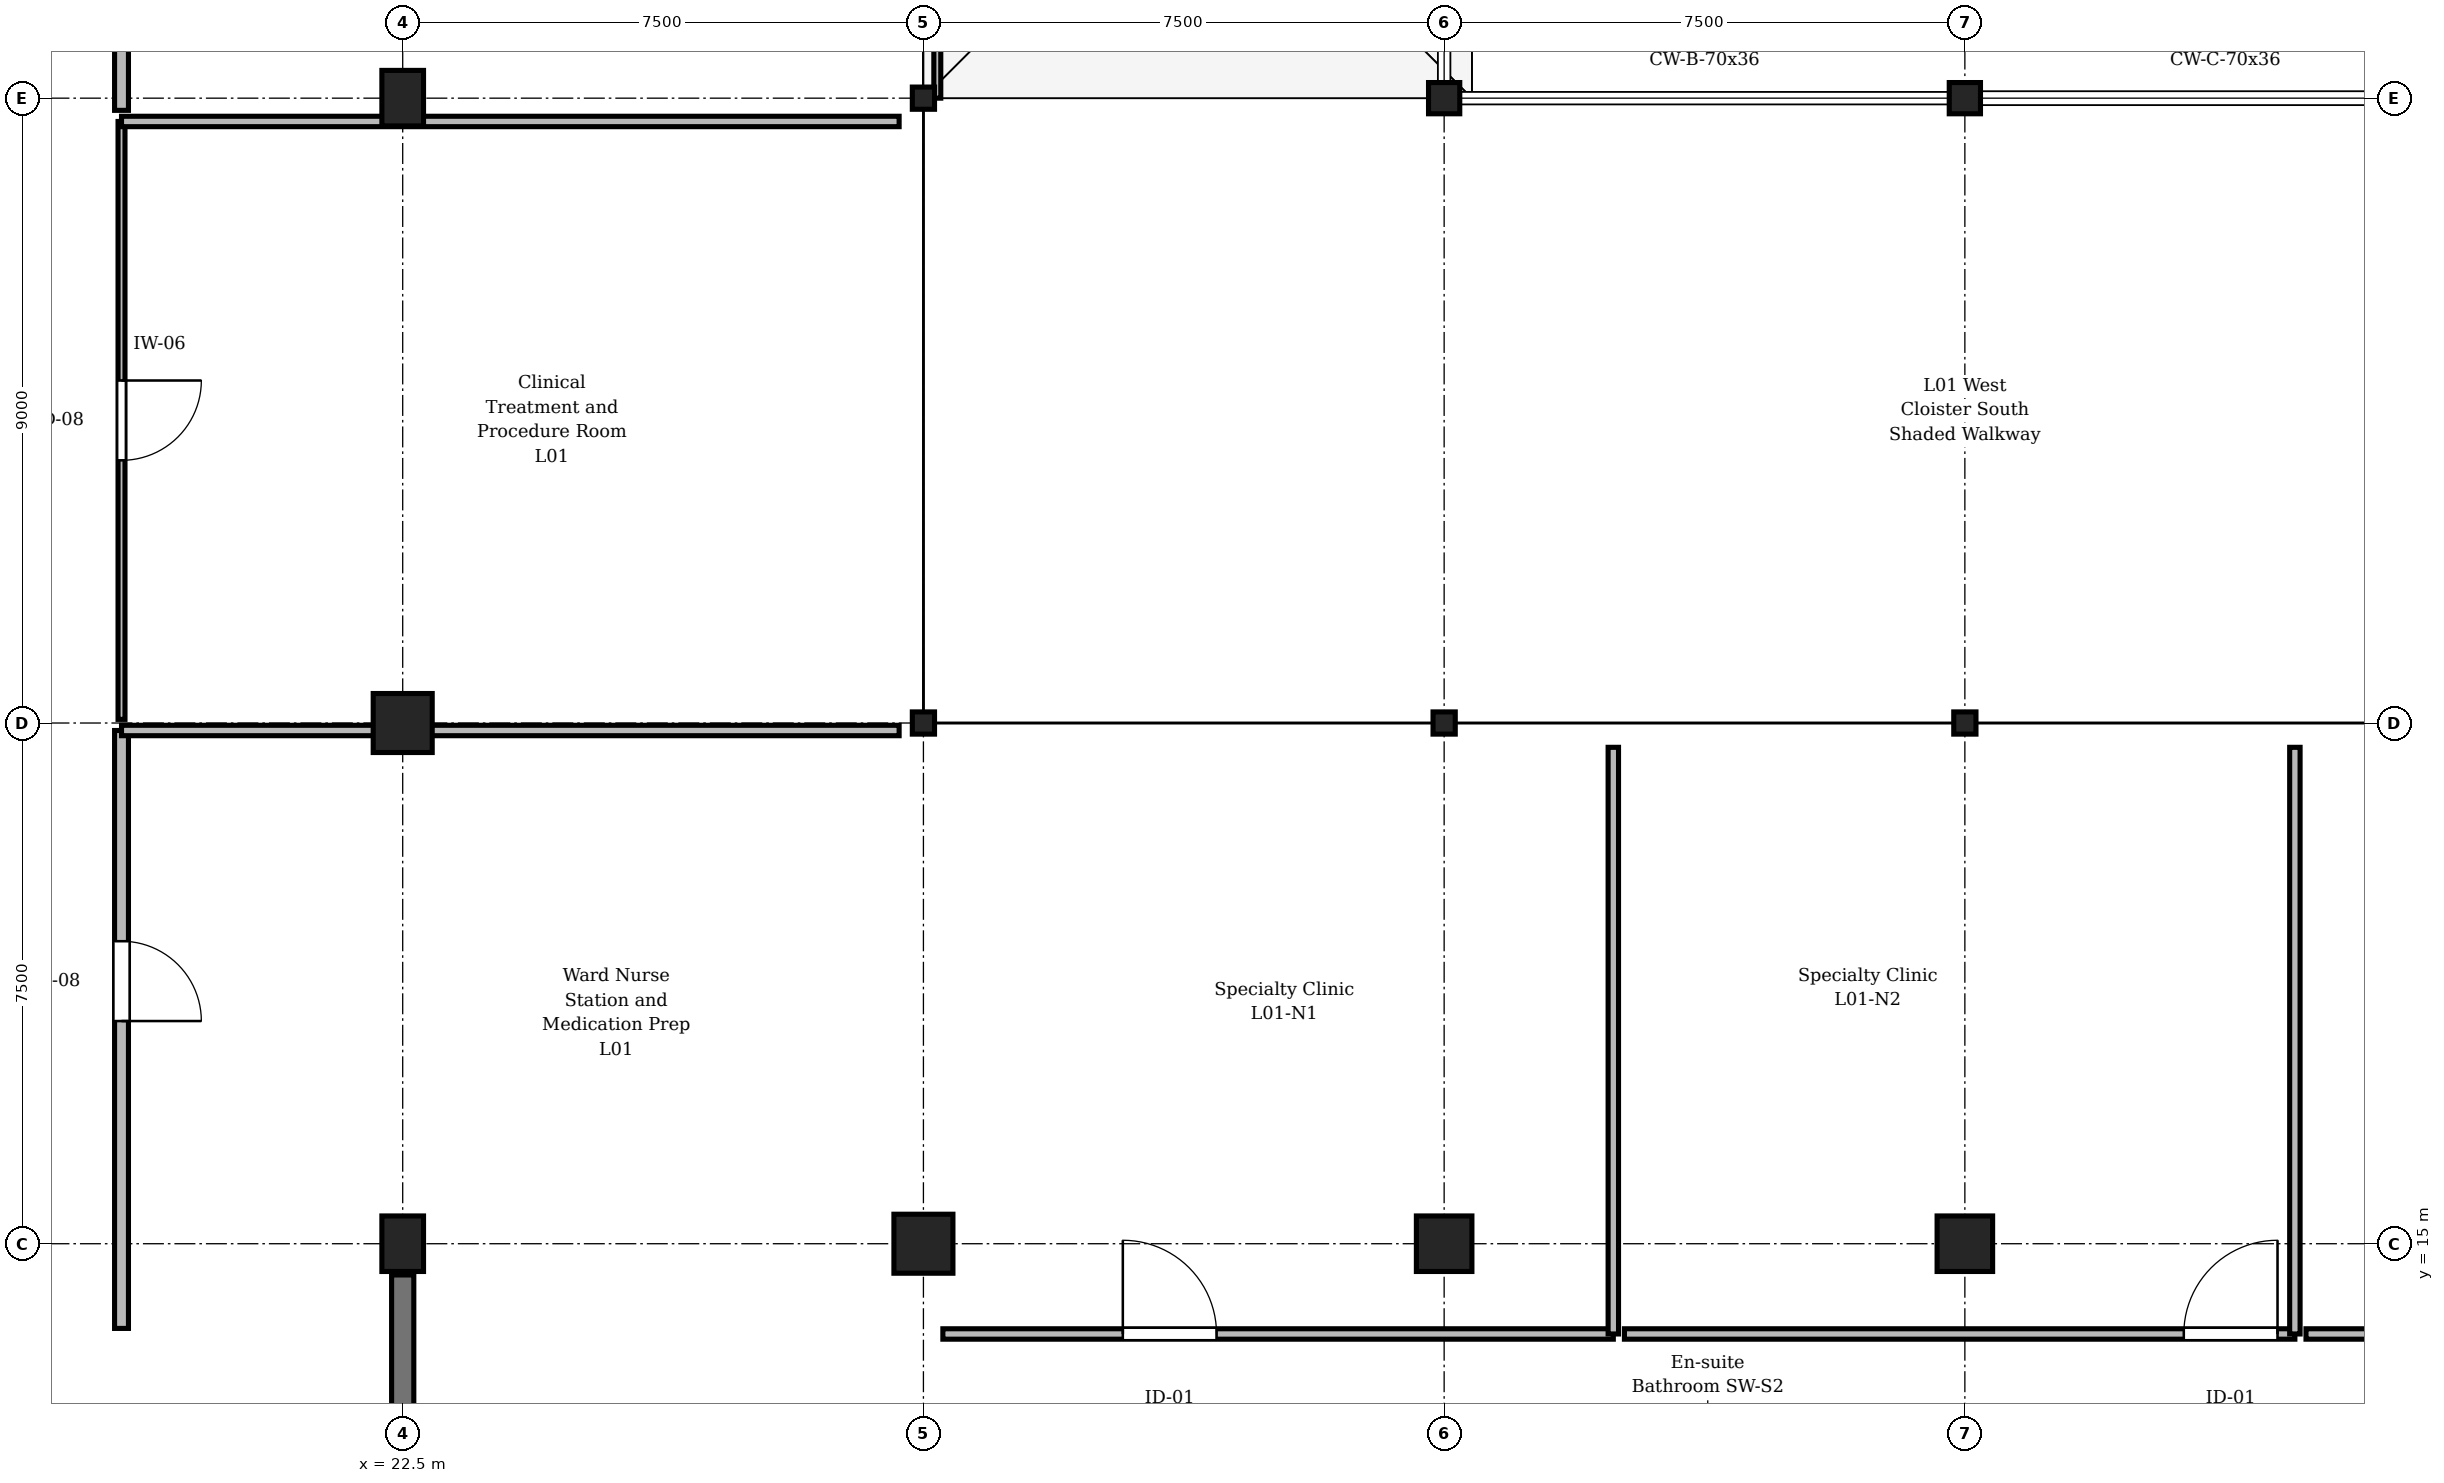
"""IFC4 building model, lengths in metres.
Left out: names, types, materials, properties, quantities, classifications, styles, units other than length and angle.
Written with IfcOpenShell. Run it as: python <this file> out.ifc"""

import sys

from ifc_helpers import new_model, si_unit, direction, frame, frame_2d, origin, origin_2d, place, context, subcontext, project, spatial, rectangle, extrude, element, fill, save


model = new_model("IFC4")
c1 = context("Model", 3, precision=1e-05, world=origin(), true_north=direction((0.0, 1.0)))
c2 = subcontext(c1, "Body", "Model", "MODEL_VIEW")
j1 = project(units=[si_unit("LENGTHUNIT", "METRE"), si_unit("PLANEANGLEUNIT", "RADIAN")], contexts=[c1])
p1 = place(None, origin())
s1 = spatial("IfcSite", under=j1, at=p1, CompositionType="ELEMENT")
p2 = place(p1, origin())
s2 = spatial("IfcBuilding", under=s1, at=p2, CompositionType="ELEMENT")
p3 = place(p2, frame((0.0, 0.0, 4.8)))
s3 = spatial("IfcBuildingStorey", under=s2, at=p3, CompositionType="ELEMENT", Elevation=4.8)
p4 = place(p3, frame((22.5, 15.0, 0.0), z_axis=(0.0, 0.0, 1.0), x_axis=(1.0, 0.0, 0.0)))
e1 = element("IfcColumn", 1, at=p4, inside=s3, PredefinedType="COLUMN", context=c2, shape_type="SweptSolid", body=[
    extrude(rectangle(XDim=0.6, YDim=0.8, at=origin_2d()), origin(), (0.0, 0.0, 1.0), 4.5),
])
p5 = place(p3, frame((22.5, 22.5, 0.0), z_axis=(0.0, 0.0, 1.0), x_axis=(1.0, 0.0, 0.0)))
e2 = element("IfcColumn", 2, at=p5, inside=s3, PredefinedType="COLUMN", context=c2, shape_type="SweptSolid", body=[
    extrude(rectangle(XDim=0.85, YDim=0.85, at=origin_2d()), origin(), (0.0, 0.0, 1.0), 4.5),
])
p6 = place(p3, frame((22.5, 31.5, 0.0), z_axis=(0.0, 0.0, 1.0), x_axis=(1.0, 0.0, 0.0)))
e3 = element("IfcColumn", 3, at=p6, inside=s3, PredefinedType="COLUMN", context=c2, shape_type="SweptSolid", body=[
    extrude(rectangle(XDim=0.6, YDim=0.8, at=origin_2d()), origin(), (0.0, 0.0, 1.0), 4.5),
])
p7 = place(p3, frame((30.0, 15.0, 0.0), z_axis=(0.0, 0.0, 1.0), x_axis=(1.0, 0.0, 0.0)))
e4 = element("IfcColumn", 4, at=p7, inside=s3, PredefinedType="COLUMN", context=c2, shape_type="SweptSolid", body=[
    extrude(rectangle(XDim=0.85, YDim=0.85, at=origin_2d()), origin(), (0.0, 0.0, 1.0), 4.5),
])
for number, where, z_axis, x_axis in (
    (5, (30.0, 22.5, 0.0), (0.0, 0.0, 1.0), (1.0, 0.0, 0.0)),
    (6, (30.0, 31.5, 0.0), (0.0, 0.0, 1.0), (1.0, 0.0, 0.0)),
):
    element("IfcColumn", number, at=place(p3, frame(where, z_axis=z_axis, x_axis=x_axis)), inside=s3, PredefinedType="COLUMN", context=c2, shape_type="SweptSolid", body=[
        extrude(rectangle(XDim=0.32, YDim=0.32, at=origin_2d()), origin(), (0.0, 0.0, 1.0), 4.5),
    ])
p8 = place(p3, frame((37.5, 15.0, 0.0), z_axis=(0.0, 0.0, 1.0), x_axis=(1.0, 0.0, 0.0)))
e7 = element("IfcColumn", 7, at=p8, inside=s3, PredefinedType="COLUMN", context=c2, shape_type="SweptSolid", body=[
    extrude(rectangle(XDim=0.8, YDim=0.8, at=origin_2d()), origin(), (0.0, 0.0, 1.0), 4.5),
])
p9 = place(p3, frame((37.5, 22.5, 0.0), z_axis=(0.0, 0.0, 1.0), x_axis=(1.0, 0.0, 0.0)))
e8 = element("IfcColumn", 8, at=p9, inside=s3, PredefinedType="COLUMN", context=c2, shape_type="SweptSolid", body=[
    extrude(rectangle(XDim=0.32, YDim=0.32, at=origin_2d()), origin(), (0.0, 0.0, 1.0), 4.5),
])
p10 = place(p3, frame((37.5, 31.5, 0.0), z_axis=(0.0, 0.0, 1.0), x_axis=(1.0, 0.0, 0.0)))
e9 = element("IfcColumn", 9, at=p10, inside=s3, PredefinedType="COLUMN", context=c2, shape_type="SweptSolid", body=[
    extrude(rectangle(XDim=0.45, YDim=0.45, at=origin_2d()), origin(), (0.0, 0.0, 1.0), 4.5),
])
p11 = place(p3, frame((45.0, 15.0, 0.0), z_axis=(0.0, 0.0, 1.0), x_axis=(1.0, 0.0, 0.0)))
e10 = element("IfcColumn", 10, at=p11, inside=s3, PredefinedType="COLUMN", context=c2, shape_type="SweptSolid", body=[
    extrude(rectangle(XDim=0.8, YDim=0.8, at=origin_2d()), origin(), (0.0, 0.0, 1.0), 4.5),
])
p12 = place(p3, frame((45.0, 22.5, 0.0), z_axis=(0.0, 0.0, 1.0), x_axis=(1.0, 0.0, 0.0)))
e11 = element("IfcColumn", 11, at=p12, inside=s3, PredefinedType="COLUMN", context=c2, shape_type="SweptSolid", body=[
    extrude(rectangle(XDim=0.32, YDim=0.32, at=origin_2d()), origin(), (0.0, 0.0, 1.0), 4.5),
])
p13 = place(p3, frame((45.0, 31.5, 0.0), z_axis=(0.0, 0.0, 1.0), x_axis=(1.0, 0.0, 0.0)))
e12 = element("IfcColumn", 12, at=p13, inside=s3, PredefinedType="COLUMN", context=c2, shape_type="SweptSolid", body=[
    extrude(rectangle(XDim=0.45, YDim=0.45, at=origin_2d()), origin(), (0.0, 0.0, 1.0), 4.5),
])
p14 = place(p3, frame((22.5, 7.95, 0.0), z_axis=(0.0, 0.0, 1.0), x_axis=(0.0, 1.0, 0.0)))
e13 = element("IfcWall", 13, at=p14, inside=s3, PredefinedType="SHEAR", context=c2, shape_type="SweptSolid", body=[
    extrude(rectangle(XDim=6.6, YDim=0.32, at=frame_2d((3.3, 0.0))), origin(), (0.0, 0.0, 1.0), 3.63),
])
p15 = place(p3, frame((18.45, 22.392, 0.0), z_axis=(0.0, 0.0, 1.0), x_axis=(0.0, -1.0, 0.0)))
e14 = element("IfcWall", 14, at=p15, inside=s3, PredefinedType="STANDARD", context=c2, shape_type="SweptSolid", body=[
    extrude(rectangle(XDim=8.612, YDim=0.2, at=frame_2d((4.306, 0.0))), origin(), (0.0, 0.0, 1.0), 3.765),
])
p16 = place(p15, frame((3.035, 0.0, 0.0)))
e15 = element("IfcOpeningElement", 15, at=p16, cuts=e14, PredefinedType="OPENING", context=c2, shape_type="SweptSolid", body=[
    extrude(rectangle(XDim=1.15, YDim=2.2, at=frame_2d((0.575, 1.1))), frame((0.0, 0.11, 0.0), z_axis=(0.0, -1.0, 0.0), x_axis=(1.0, 0.0, 0.0)), (0.0, 0.0, 1.0), 0.22),
])
p17 = place(p3, frame((18.45, 31.164, 0.0), z_axis=(0.0, 0.0, 1.0), x_axis=(0.0, -1.0, 0.0)))
e16 = element("IfcWall", 16, at=p17, inside=s3, PredefinedType="PARTITIONING", context=c2, shape_type="SweptSolid", body=[
    extrude(rectangle(XDim=8.612, YDim=0.1, at=frame_2d((4.306, 0.0))), origin(), (0.0, 0.0, 1.0), 3.765),
])
p18 = place(p17, frame((3.731, 0.0, 0.0)))
e17 = element("IfcOpeningElement", 17, at=p18, cuts=e16, PredefinedType="OPENING", context=c2, shape_type="SweptSolid", body=[
    extrude(rectangle(XDim=1.15, YDim=2.2, at=frame_2d((0.575, 1.1))), frame((0.0, 0.06, 0.0), z_axis=(0.0, -1.0, 0.0), x_axis=(1.0, 0.0, 0.0)), (0.0, 0.0, 1.0), 0.12),
])
p19 = place(p3, frame((18.45, 39.937, 0.0), z_axis=(0.0, 0.0, 1.0), x_axis=(0.0, -1.0, 0.0)))
e18 = element("IfcWall", 18, at=p19, inside=s3, PredefinedType="STANDARD", context=c2, shape_type="SweptSolid", body=[
    extrude(rectangle(XDim=8.612, YDim=0.2, at=frame_2d((4.306, 0.0))), origin(), (0.0, 0.0, 1.0), 3.765),
])
p20 = place(p19, frame((4.487, 0.0, 0.0)))
e19 = element("IfcOpeningElement", 19, at=p20, cuts=e18, PredefinedType="OPENING", context=c2, shape_type="SweptSolid", body=[
    extrude(rectangle(XDim=1.05, YDim=2.2, at=frame_2d((0.525, 1.1))), frame((0.0, 0.11, 0.0), z_axis=(0.0, -1.0, 0.0), x_axis=(1.0, 0.0, 0.0)), (0.0, 0.0, 1.0), 0.22),
])
p21 = place(p3, frame((30.28, 13.7, 0.0), z_axis=(0.0, 0.0, 1.0), x_axis=(1.0, 0.0, 0.0)))
e20 = element("IfcWall", 20, at=p21, inside=s3, PredefinedType="PARTITIONING", context=c2, shape_type="SweptSolid", body=[
    extrude(rectangle(XDim=9.657, YDim=0.15, at=frame_2d((4.828, 0.0))), origin(), (0.0, 0.0, 1.0), 4.165),
])
p22 = place(p21, frame((2.592, 0.0, 0.0)))
e21 = element("IfcOpeningElement", 21, at=p22, cuts=e20, PredefinedType="OPENING", context=c2, shape_type="SweptSolid", body=[
    extrude(rectangle(XDim=1.35, YDim=2.25, at=frame_2d((0.675, 1.125))), frame((0.0, 0.085, 0.0), z_axis=(0.0, -1.0, 0.0), x_axis=(1.0, 0.0, 0.0)), (0.0, 0.0, 1.0), 0.17),
])
p23 = place(p3, frame((40.097, 13.7, 0.0), z_axis=(0.0, 0.0, 1.0), x_axis=(1.0, 0.0, 0.0)))
e22 = element("IfcWall", 22, at=p23, inside=s3, PredefinedType="PARTITIONING", context=c2, shape_type="SweptSolid", body=[
    extrude(rectangle(XDim=9.657, YDim=0.15, at=frame_2d((4.828, 0.0))), origin(), (0.0, 0.0, 1.0), 4.165),
])
p24 = place(p23, frame((8.057, 0.0, 0.0)))
e23 = element("IfcOpeningElement", 23, at=p24, cuts=e22, PredefinedType="OPENING", context=c2, shape_type="SweptSolid", body=[
    extrude(rectangle(XDim=1.35, YDim=2.25, at=frame_2d((0.675, 1.125))), frame((0.0, 0.085, 0.0), z_axis=(0.0, -1.0, 0.0), x_axis=(1.0, 0.0, 0.0)), (0.0, 0.0, 1.0), 0.17),
])
p25 = place(p3, frame((49.913, 13.7, 0.0), z_axis=(0.0, 0.0, 1.0), x_axis=(1.0, 0.0, 0.0)))
e24 = element("IfcWall", 24, at=p25, inside=s3, PredefinedType="PARTITIONING", context=c2, shape_type="SweptSolid", body=[
    extrude(rectangle(XDim=9.657, YDim=0.15, at=frame_2d((4.828, 0.0))), origin(), (0.0, 0.0, 1.0), 4.165),
])
p26 = place(p25, frame((5.715, 0.0, 0.0)))
e25 = element("IfcOpeningElement", 25, at=p26, cuts=e24, PredefinedType="OPENING", context=c2, shape_type="SweptSolid", body=[
    extrude(rectangle(XDim=1.35, YDim=2.25, at=frame_2d((0.675, 1.125))), frame((0.0, 0.085, 0.0), z_axis=(0.0, -1.0, 0.0), x_axis=(1.0, 0.0, 0.0)), (0.0, 0.0, 1.0), 0.17),
])
p27 = place(p3, frame((30.2, 76.15, 0.0), z_axis=(0.0, 0.0, 1.0), x_axis=(0.0, -1.0, 0.0)))
e26 = element("IfcWall", 26, at=p27, inside=s3, PredefinedType="PARTITIONING", context=c2, shape_type="SweptSolid", body=[
    extrude(rectangle(XDim=44.65, YDim=0.1, at=frame_2d((22.325, 0.0))), origin(), (0.0, 0.0, 1.0), 3.615),
])
p28 = place(p27, frame((17.49, 0.0, 0.0)))
e27 = element("IfcOpeningElement", 27, at=p28, cuts=e26, PredefinedType="OPENING", context=c2, shape_type="SweptSolid", body=[
    extrude(rectangle(XDim=1.05, YDim=2.2, at=frame_2d((0.525, 1.1))), frame((0.0, 0.06, 0.0), z_axis=(0.0, -1.0, 0.0), x_axis=(1.0, 0.0, 0.0)), (0.0, 0.0, 1.0), 0.12),
])
for number, where, z_axis, x_axis in (
    (28, (18.45, 22.392, 0.0), (0.0, 0.0, 1.0), (1.0, 0.0, 0.0)),
    (29, (18.45, 31.164, 0.0), (0.0, 0.0, 1.0), (1.0, 0.0, 0.0)),
):
    element("IfcWall", number, at=place(p3, frame(where, z_axis=z_axis, x_axis=x_axis)), inside=s3, PredefinedType="PARTITIONING", context=c2, shape_type="SweptSolid", body=[
        extrude(rectangle(XDim=11.2, YDim=0.15, at=frame_2d((5.6, 0.0))), origin(), (0.0, 0.0, 1.0), 3.515),
    ])
for number, where, z_axis, x_axis in (
    (30, (39.937, 13.7, 0.0), (0.0, 0.0, 1.0), (0.0, 1.0, 0.0)),
    (31, (49.753, 13.7, 0.0), (0.0, 0.0, 1.0), (0.0, 1.0, 0.0)),
):
    element("IfcWall", number, at=place(p3, frame(where, z_axis=z_axis, x_axis=x_axis)), inside=s3, PredefinedType="PARTITIONING", context=c2, shape_type="SweptSolid", body=[
        extrude(rectangle(XDim=8.45, YDim=0.15, at=frame_2d((4.225, 0.0))), origin(), (0.0, 0.0, 1.0), 4.165),
    ])
p29 = place(p16, origin())
e32 = element("IfcDoor", 32, at=p29, inside=s3, OperationType="SINGLE_SWING_RIGHT", PredefinedType="DOOR", context=c2, shape_type="SweptSolid", body=[
    extrude(rectangle(XDim=1.15, YDim=2.2, at=frame_2d((0.575, 1.1))), frame((0.0, 0.025, 0.0), z_axis=(0.0, -1.0, 0.0), x_axis=(1.0, 0.0, 0.0)), (0.0, 0.0, 1.0), 0.05),
])
fill(e15, e32)
p30 = place(p18, origin())
e33 = element("IfcDoor", 33, at=p30, inside=s3, OperationType="SINGLE_SWING_LEFT", PredefinedType="DOOR", context=c2, shape_type="SweptSolid", body=[
    extrude(rectangle(XDim=1.15, YDim=2.2, at=frame_2d((0.575, 1.1))), frame((0.0, 0.025, 0.0), z_axis=(0.0, -1.0, 0.0), x_axis=(1.0, 0.0, 0.0)), (0.0, 0.0, 1.0), 0.05),
])
fill(e17, e33)
p31 = place(p22, origin())
e34 = element("IfcDoor", 34, at=p31, inside=s3, OperationType="SINGLE_SWING_LEFT", PredefinedType="DOOR", context=c2, shape_type="SweptSolid", body=[
    extrude(rectangle(XDim=1.35, YDim=2.25, at=frame_2d((0.675, 1.125))), frame((0.0, 0.025, 0.0), z_axis=(0.0, -1.0, 0.0), x_axis=(1.0, 0.0, 0.0)), (0.0, 0.0, 1.0), 0.05),
])
fill(e21, e34)
p32 = place(p24, origin())
e35 = element("IfcDoor", 35, at=p32, inside=s3, OperationType="SINGLE_SWING_RIGHT", PredefinedType="DOOR", context=c2, shape_type="SweptSolid", body=[
    extrude(rectangle(XDim=1.35, YDim=2.25, at=frame_2d((0.675, 1.125))), frame((0.0, 0.025, 0.0), z_axis=(0.0, -1.0, 0.0), x_axis=(1.0, 0.0, 0.0)), (0.0, 0.0, 1.0), 0.05),
])
fill(e23, e35)
save(model, sys.argv[1])
